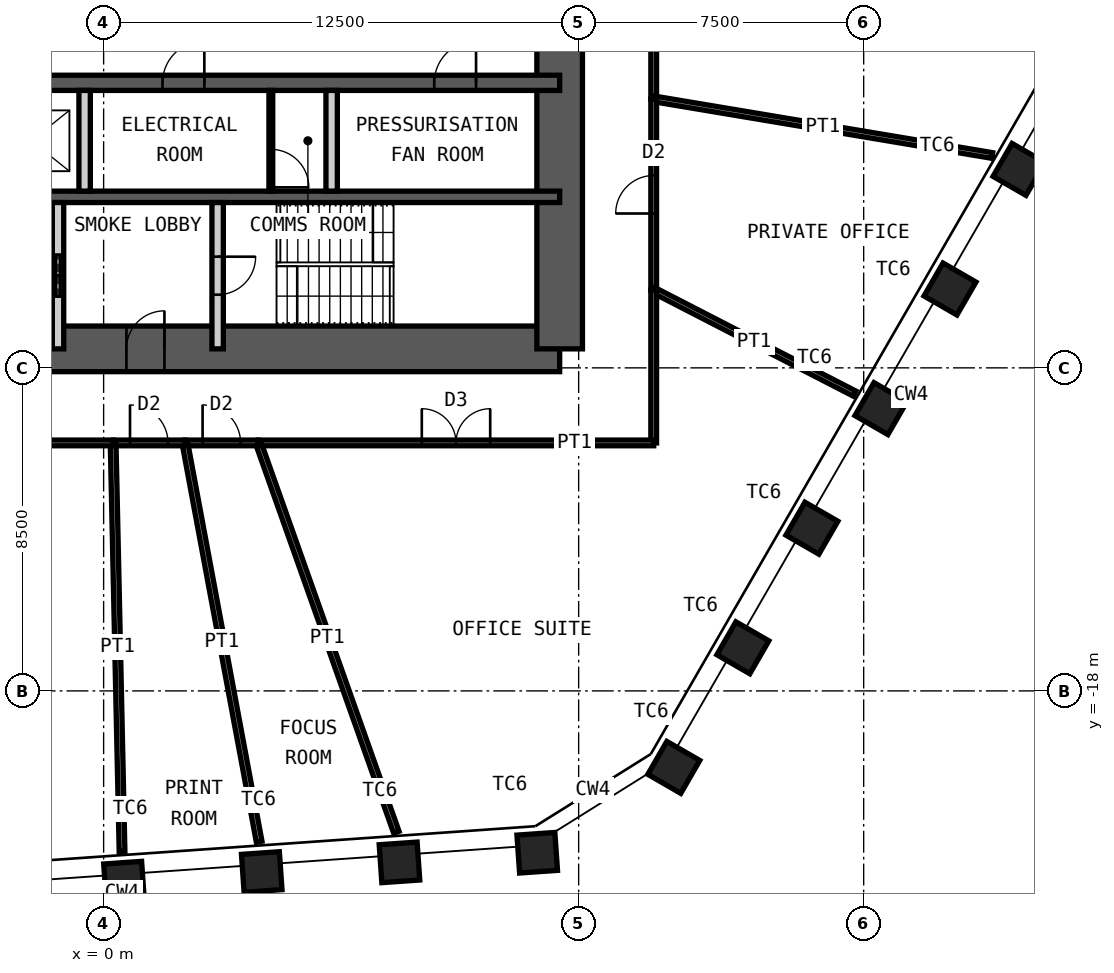
"""IFC4 building model, lengths in metres.
Left out: names, types, materials, properties, quantities, classifications, styles, units other than length and angle.
Written with IfcOpenShell. Run it as: python <this file> out.ifc"""

import sys

from ifc_helpers import new_model, si_unit, direction, frame, frame_2d, origin, origin_2d, place, context, subcontext, project, spatial, rectangle, hollow_rectangle, extrude, element, fill, save


model = new_model("IFC4")
c1 = context("Model", 3, precision=1e-05, world=origin(), true_north=direction((0.0, 1.0)))
c2 = subcontext(c1, "Body", "Model", "MODEL_VIEW")
j1 = project(units=[si_unit("LENGTHUNIT", "METRE"), si_unit("PLANEANGLEUNIT", "RADIAN")], contexts=[c1])
p1 = place(None, origin())
s1 = spatial("IfcSite", under=j1, at=p1, CompositionType="ELEMENT")
p2 = place(p1, origin())
s2 = spatial("IfcBuilding", under=s1, at=p2, CompositionType="ELEMENT")
p3 = place(p2, frame((0.0, 0.0, 230.8)))
s3 = spatial("IfcBuildingStorey", under=s2, at=p3, CompositionType="ELEMENT", Elevation=230.8)
for number, where, z_axis, x_axis in (
    (1, (24.088, -4.279, 0.0), (0.0, 0.0, 1.0), (0.5, 0.866, 0.0)),
    (2, (22.271, -7.426, 0.0), (0.0, 0.0, 1.0), (0.5, 0.866, 0.0)),
    (3, (20.454, -10.572, 0.0), (0.0, 0.0, 1.0), (0.5, 0.866, 0.0)),
    (4, (18.637, -13.719, 0.0), (0.0, 0.0, 1.0), (0.5, 0.866, 0.0)),
    (5, (16.821, -16.866, 0.0), (0.0, 0.0, 1.0), (0.5, 0.866, 0.0)),
    (6, (15.004, -20.012, 0.0), (0.0, 0.0, 1.0), (0.5, 0.866, 0.0)),
    (7, (11.41, -22.258, 0.0), (0.0, 0.0, 1.0), (0.998, 0.07, 0.0)),
    (8, (7.785, -22.512, 0.0), (0.0, 0.0, 1.0), (0.998, 0.07, 0.0)),
    (9, (4.16, -22.765, 0.0), (0.0, 0.0, 1.0), (0.998, 0.07, 0.0)),
    (10, (0.536, -23.019, 0.0), (0.0, 0.0, 1.0), (0.998, 0.07, 0.0)),
):
    element("IfcColumn", number, at=place(p3, frame(where, z_axis=z_axis, x_axis=x_axis)), inside=s3, PredefinedType="COLUMN", context=c2, shape_type="SweptSolid", body=[
        extrude(hollow_rectangle(XDim=1.0, YDim=1.0, WallThickness=0.06, at=origin_2d()), origin(), (0.0, 0.0, 1.0), 4.2),
    ])
p4 = place(p3, frame((-12.0, -9.0, 0.0), z_axis=(0.0, 0.0, 1.0), x_axis=(1.0, 0.0, 0.0)))
e11 = element("IfcWall", 11, at=p4, inside=s3, PredefinedType="SHEAR", context=c2, shape_type="SweptSolid", body=[
    extrude(rectangle(XDim=24.0, YDim=1.2, at=frame_2d((12.0, 0.0))), origin(), (0.0, 0.0, 1.0), 4.2),
])
p5 = place(p4, frame((1.35, 0.0, 0.0)))
e12 = element("IfcOpeningElement", 12, at=p5, cuts=e11, PredefinedType="OPENING", context=c2, shape_type="SweptSolid", body=[
    extrude(rectangle(XDim=1.0, YDim=2.1, at=frame_2d((0.5, 1.05))), frame((0.0, 0.61, 0.0), z_axis=(0.0, -1.0, 0.0), x_axis=(1.0, 0.0, 0.0)), (0.0, 0.0, 1.0), 1.22),
])
p6 = place(p4, frame((5.325, 0.0, 0.0)))
e13 = element("IfcOpeningElement", 13, at=p6, cuts=e11, PredefinedType="OPENING", context=c2, shape_type="SweptSolid", body=[
    extrude(rectangle(XDim=1.15, YDim=2.1, at=frame_2d((0.575, 1.05))), frame((0.0, 0.61, 0.0), z_axis=(0.0, -1.0, 0.0), x_axis=(1.0, 0.0, 0.0)), (0.0, 0.0, 1.0), 1.22),
])
p7 = place(p4, frame((12.6, 0.0, 0.0)))
e14 = element("IfcOpeningElement", 14, at=p7, cuts=e11, PredefinedType="OPENING", context=c2, shape_type="SweptSolid", body=[
    extrude(rectangle(XDim=1.0, YDim=2.1, at=frame_2d((0.5, 1.05))), frame((0.0, 0.61, 0.0), z_axis=(0.0, -1.0, 0.0), x_axis=(1.0, 0.0, 0.0)), (0.0, 0.0, 1.0), 1.22),
])
p8 = place(p3, frame((12.0, -9.0, 0.0), z_axis=(0.0, 0.0, 1.0), x_axis=(0.0, 1.0, 0.0)))
e15 = element("IfcWall", 15, at=p8, inside=s3, PredefinedType="SHEAR", context=c2, shape_type="SweptSolid", body=[
    extrude(rectangle(XDim=18.0, YDim=1.2, at=frame_2d((9.0, 0.0))), origin(), (0.0, 0.0, 1.0), 4.2),
])
p9 = place(p8, frame((8.1, 0.0, 0.0)))
e16 = element("IfcOpeningElement", 16, at=p9, cuts=e15, PredefinedType="OPENING", context=c2, shape_type="SweptSolid", body=[
    extrude(rectangle(XDim=1.8, YDim=2.1, at=frame_2d((0.9, 1.05))), frame((0.0, 0.61, 0.0), z_axis=(0.0, -1.0, 0.0), x_axis=(1.0, 0.0, 0.0)), (0.0, 0.0, 1.0), 1.22),
])
p10 = place(p3, frame((-12.0, -2.0, 0.0), z_axis=(0.0, 0.0, 1.0), x_axis=(1.0, 0.0, 0.0)))
e17 = element("IfcWall", 17, at=p10, inside=s3, PredefinedType="SHEAR", context=c2, shape_type="SweptSolid", body=[
    extrude(rectangle(XDim=24.0, YDim=0.4, at=frame_2d((12.0, 0.0))), origin(), (0.0, 0.0, 1.0), 4.2),
])
p11 = place(p10, frame((1.1, 0.0, 0.0)))
e18 = element("IfcOpeningElement", 18, at=p11, cuts=e17, PredefinedType="OPENING", context=c2, shape_type="SweptSolid", body=[
    extrude(rectangle(XDim=1.1, YDim=2.1, at=frame_2d((0.55, 1.05))), frame((0.0, 0.21, 0.0), z_axis=(0.0, -1.0, 0.0), x_axis=(1.0, 0.0, 0.0)), (0.0, 0.0, 1.0), 0.42),
])
p12 = place(p10, frame((13.55, 0.0, 0.0)))
e19 = element("IfcOpeningElement", 19, at=p12, cuts=e17, PredefinedType="OPENING", context=c2, shape_type="SweptSolid", body=[
    extrude(rectangle(XDim=1.1, YDim=2.1, at=frame_2d((0.55, 1.05))), frame((0.0, 0.21, 0.0), z_axis=(0.0, -1.0, 0.0), x_axis=(1.0, 0.0, 0.0)), (0.0, 0.0, 1.0), 0.42),
])
p13 = place(p10, frame((20.7, 0.0, 0.0)))
e20 = element("IfcOpeningElement", 20, at=p13, cuts=e17, PredefinedType="OPENING", context=c2, shape_type="SweptSolid", body=[
    extrude(rectangle(XDim=1.1, YDim=2.1, at=frame_2d((0.55, 1.05))), frame((0.0, 0.21, 0.0), z_axis=(0.0, -1.0, 0.0), x_axis=(1.0, 0.0, 0.0)), (0.0, 0.0, 1.0), 0.42),
])
p14 = place(p10, frame((4.0, 0.0, 0.0)))
e21 = element("IfcOpeningElement", 21, at=p14, cuts=e17, PredefinedType="OPENING", context=c2, shape_type="SweptSolid", body=[
    extrude(rectangle(XDim=1.0, YDim=2.1, at=frame_2d((0.5, 1.05))), frame((0.0, 0.21, 0.0), z_axis=(0.0, -1.0, 0.0), x_axis=(1.0, 0.0, 0.0)), (0.0, 0.0, 1.0), 0.42),
])
p15 = place(p10, frame((6.8, 0.0, 0.0)))
e22 = element("IfcOpeningElement", 22, at=p15, cuts=e17, PredefinedType="OPENING", context=c2, shape_type="SweptSolid", body=[
    extrude(rectangle(XDim=1.0, YDim=2.1, at=frame_2d((0.5, 1.05))), frame((0.0, 0.21, 0.0), z_axis=(0.0, -1.0, 0.0), x_axis=(1.0, 0.0, 0.0)), (0.0, 0.0, 1.0), 0.42),
])
p16 = place(p3, frame((-12.0, -5.0, 0.0), z_axis=(0.0, 0.0, 1.0), x_axis=(1.0, 0.0, 0.0)))
e23 = element("IfcWall", 23, at=p16, inside=s3, PredefinedType="SHEAR", context=c2, shape_type="SweptSolid", body=[
    extrude(rectangle(XDim=24.0, YDim=0.3, at=frame_2d((12.0, 0.0))), origin(), (0.0, 0.0, 1.0), 4.2),
])
for number, where, z_axis, x_axis in (
    (24, (-0.5, -4.85, 0.0), (0.0, 0.0, 1.0), (0.0, 1.0, 0.0)),
    (25, (6.0, -4.85, 0.0), (0.0, 0.0, 1.0), (0.0, 1.0, 0.0)),
):
    element("IfcWall", number, at=place(p3, frame(where, z_axis=z_axis, x_axis=x_axis)), inside=s3, PredefinedType="PARTITIONING", context=c2, shape_type="SweptSolid", body=[
        extrude(rectangle(XDim=2.65, YDim=0.3, at=frame_2d((1.325, 0.0))), origin(), (0.0, 0.0, 1.0), 3.98),
    ])
p17 = place(p3, frame((-1.2, -9.0, 0.0), z_axis=(0.0, 0.0, 1.0), x_axis=(0.0, 1.0, 0.0)))
e26 = element("IfcWall", 26, at=p17, inside=s3, PredefinedType="PARTITIONING", context=c2, shape_type="SweptSolid", body=[
    extrude(rectangle(XDim=3.85, YDim=0.3, at=frame_2d((1.925, 0.0))), origin(), (0.0, 0.0, 1.0), 3.98),
])
p18 = place(p17, frame((1.375, 0.0, 0.0)))
e27 = element("IfcOpeningElement", 27, at=p18, cuts=e26, PredefinedType="OPENING", context=c2, shape_type="SweptSolid", body=[
    extrude(rectangle(XDim=1.1, YDim=2.4, at=frame_2d((0.55, 1.2))), frame((0.0, 0.16, 0.0), z_axis=(0.0, -1.0, 0.0), x_axis=(1.0, 0.0, 0.0)), (0.0, 0.0, 1.0), 0.32),
])
p19 = place(p3, frame((3.0, -9.0, 0.0), z_axis=(0.0, 0.0, 1.0), x_axis=(0.0, 1.0, 0.0)))
e28 = element("IfcWall", 28, at=p19, inside=s3, PredefinedType="PARTITIONING", context=c2, shape_type="SweptSolid", body=[
    extrude(rectangle(XDim=3.85, YDim=0.3, at=frame_2d((1.925, 0.0))), origin(), (0.0, 0.0, 1.0), 3.98),
])
p20 = place(p19, frame((1.425, 0.0, 0.0)))
e29 = element("IfcOpeningElement", 29, at=p20, cuts=e28, PredefinedType="OPENING", context=c2, shape_type="SweptSolid", body=[
    extrude(rectangle(XDim=1.0, YDim=2.1, at=frame_2d((0.5, 1.05))), frame((0.0, 0.16, 0.0), z_axis=(0.0, -1.0, 0.0), x_axis=(1.0, 0.0, 0.0)), (0.0, 0.0, 1.0), 0.32),
])
p21 = place(p3, frame((4.4, -4.85, 0.0), z_axis=(0.0, 0.0, 1.0), x_axis=(0.0, 1.0, 0.0)))
e30 = element("IfcWall", 30, at=p21, inside=s3, PredefinedType="PARTITIONING", context=c2, shape_type="SweptSolid", body=[
    extrude(rectangle(XDim=2.65, YDim=0.1, at=frame_2d((1.325, 0.0))), origin(), (0.0, 0.0, 1.0), 3.98),
])
p22 = place(p21, frame((0.1, 0.0, 0.0)))
e31 = element("IfcOpeningElement", 31, at=p22, cuts=e30, PredefinedType="OPENING", context=c2, shape_type="SweptSolid", body=[
    extrude(rectangle(XDim=1.0, YDim=2.4, at=frame_2d((0.5, 1.2))), frame((0.0, 0.06, 0.0), z_axis=(0.0, -1.0, 0.0), x_axis=(1.0, 0.0, 0.0)), (0.0, 0.0, 1.0), 0.12),
])
p23 = place(p3, frame((14.475, 3.475, 0.0), z_axis=(0.0, 0.0, 1.0), x_axis=(0.0, -1.0, 0.0)))
e32 = element("IfcWall", 32, at=p23, inside=s3, PredefinedType="PARTITIONING", context=c2, shape_type="SweptSolid", body=[
    extrude(rectangle(XDim=5.896, YDim=0.15, at=frame_2d((2.948, 0.0))), origin(), (0.0, 0.0, 1.0), 4.03),
])
p24 = place(p23, frame((2.448, 0.0, 0.0)))
e33 = element("IfcOpeningElement", 33, at=p24, cuts=e32, PredefinedType="OPENING", context=c2, shape_type="SweptSolid", body=[
    extrude(rectangle(XDim=1.0, YDim=2.4, at=frame_2d((0.5, 1.2))), frame((0.0, 0.085, 0.0), z_axis=(0.0, -1.0, 0.0), x_axis=(1.0, 0.0, 0.0)), (0.0, 0.0, 1.0), 0.17),
])
p25 = place(p3, frame((23.383, -3.912, 0.0), z_axis=(0.0, 0.0, 1.0), x_axis=(-0.986293651891, 0.164999491631, 0.0)))
e34 = element("IfcWall", 34, at=p25, inside=s3, PredefinedType="PARTITIONING", context=c2, shape_type="SweptSolid", body=[
    extrude(rectangle(XDim=9.032, YDim=0.15, at=frame_2d((4.516, 0.0))), origin(), (0.0, 0.0, 1.0), 3.43),
])
p26 = place(p3, frame((14.475, -2.422, 0.0), z_axis=(0.0, 0.0, 1.0), x_axis=(0.0, -1.0, 0.0)))
e35 = element("IfcWall", 35, at=p26, inside=s3, PredefinedType="PARTITIONING", context=c2, shape_type="SweptSolid", body=[
    extrude(rectangle(XDim=5.033, YDim=0.15, at=frame_2d((2.517, 0.0))), origin(), (0.0, 0.0, 1.0), 4.03),
])
p27 = place(p26, frame((2.017, 0.0, 0.0)))
e36 = element("IfcOpeningElement", 36, at=p27, cuts=e35, PredefinedType="OPENING", context=c2, shape_type="SweptSolid", body=[
    extrude(rectangle(XDim=1.0, YDim=2.4, at=frame_2d((0.5, 1.2))), frame((0.0, 0.085, 0.0), z_axis=(0.0, -1.0, 0.0), x_axis=(1.0, 0.0, 0.0)), (0.0, 0.0, 1.0), 0.17),
])
p28 = place(p3, frame((19.759, -10.177, 0.0), z_axis=(0.0, 0.0, 1.0), x_axis=(-0.889015092721, 0.457877893017, 0.0)))
e37 = element("IfcWall", 37, at=p28, inside=s3, PredefinedType="PARTITIONING", context=c2, shape_type="SweptSolid", body=[
    extrude(rectangle(XDim=5.944, YDim=0.15, at=frame_2d((2.972, 0.0))), origin(), (0.0, 0.0, 1.0), 3.43),
])
p29 = place(p3, frame((14.475, -7.455, 0.0), z_axis=(0.0, 0.0, 1.0), x_axis=(0.0, -1.0, 0.0)))
e38 = element("IfcWall", 38, at=p29, inside=s3, PredefinedType="PARTITIONING", context=c2, shape_type="SweptSolid", body=[
    extrude(rectangle(XDim=4.02, YDim=0.15, at=frame_2d((2.01, 0.0))), origin(), (0.0, 0.0, 1.0), 4.03),
])
p30 = place(p3, frame((14.475, -11.475, 0.0), z_axis=(0.0, 0.0, 1.0), x_axis=(-1.0, 0.0, 0.0)))
e39 = element("IfcWall", 39, at=p30, inside=s3, PredefinedType="PARTITIONING", context=c2, shape_type="SweptSolid", body=[
    extrude(rectangle(XDim=10.406, YDim=0.15, at=frame_2d((5.203, 0.0))), origin(), (0.0, 0.0, 1.0), 4.03),
])
p31 = place(p30, frame((4.303, 0.0, 0.0)))
e40 = element("IfcOpeningElement", 40, at=p31, cuts=e39, PredefinedType="OPENING", context=c2, shape_type="SweptSolid", body=[
    extrude(rectangle(XDim=1.8, YDim=2.4, at=frame_2d((0.9, 1.2))), frame((0.0, 0.085, 0.0), z_axis=(0.0, -1.0, 0.0), x_axis=(1.0, 0.0, 0.0)), (0.0, 0.0, 1.0), 0.17),
])
p32 = place(p3, frame((7.703, -21.719, 0.0), z_axis=(0.0, 0.0, 1.0), x_axis=(-0.334269551553, 0.942477515331, 0.0)))
e41 = element("IfcWall", 41, at=p32, inside=s3, PredefinedType="PARTITIONING", context=c2, shape_type="SweptSolid", body=[
    extrude(rectangle(XDim=10.869, YDim=0.15, at=frame_2d((5.435, 0.0))), origin(), (0.0, 0.0, 1.0), 3.43),
])
p33 = place(p3, frame((4.07, -11.475, 0.0), z_axis=(0.0, 0.0, 1.0), x_axis=(-1.0, 0.0, 0.0)))
e42 = element("IfcWall", 42, at=p33, inside=s3, PredefinedType="PARTITIONING", context=c2, shape_type="SweptSolid", body=[
    extrude(rectangle(XDim=1.932, YDim=0.15, at=frame_2d((0.966, 0.0))), origin(), (0.0, 0.0, 1.0), 4.03),
])
p34 = place(p33, frame((0.466, 0.0, 0.0)))
e43 = element("IfcOpeningElement", 43, at=p34, cuts=e42, PredefinedType="OPENING", context=c2, shape_type="SweptSolid", body=[
    extrude(rectangle(XDim=1.0, YDim=2.4, at=frame_2d((0.5, 1.2))), frame((0.0, 0.085, 0.0), z_axis=(0.0, -1.0, 0.0), x_axis=(1.0, 0.0, 0.0)), (0.0, 0.0, 1.0), 0.17),
])
p35 = place(p3, frame((4.093, -21.969, 0.0), z_axis=(0.0, 0.0, 1.0), x_axis=(-0.183180901121, 0.983079222374, 0.0)))
e44 = element("IfcWall", 44, at=p35, inside=s3, PredefinedType="PARTITIONING", context=c2, shape_type="SweptSolid", body=[
    extrude(rectangle(XDim=10.674, YDim=0.15, at=frame_2d((5.337, 0.0))), origin(), (0.0, 0.0, 1.0), 3.43),
])
p36 = place(p3, frame((2.138, -11.475, 0.0), z_axis=(0.0, 0.0, 1.0), x_axis=(-1.0, 0.0, 0.0)))
e45 = element("IfcWall", 45, at=p36, inside=s3, PredefinedType="PARTITIONING", context=c2, shape_type="SweptSolid", body=[
    extrude(rectangle(XDim=1.888, YDim=0.15, at=frame_2d((0.944, 0.0))), origin(), (0.0, 0.0, 1.0), 4.03),
])
p37 = place(p36, frame((0.444, 0.0, 0.0)))
e46 = element("IfcOpeningElement", 46, at=p37, cuts=e45, PredefinedType="OPENING", context=c2, shape_type="SweptSolid", body=[
    extrude(rectangle(XDim=1.0, YDim=2.4, at=frame_2d((0.5, 1.2))), frame((0.0, 0.085, 0.0), z_axis=(0.0, -1.0, 0.0), x_axis=(1.0, 0.0, 0.0)), (0.0, 0.0, 1.0), 0.17),
])
p38 = place(p3, frame((0.485, -22.22, 0.0), z_axis=(0.0, 0.0, 1.0), x_axis=(-0.021806550804, 0.999762208899, 0.0)))
e47 = element("IfcWall", 47, at=p38, inside=s3, PredefinedType="PARTITIONING", context=c2, shape_type="SweptSolid", body=[
    extrude(rectangle(XDim=10.748, YDim=0.15, at=frame_2d((5.374, 0.0))), origin(), (0.0, 0.0, 1.0), 3.43),
])
p39 = place(p3, frame((0.25, -11.475, 0.0), z_axis=(0.0, 0.0, 1.0), x_axis=(-1.0, 0.0, 0.0)))
e48 = element("IfcWall", 48, at=p39, inside=s3, PredefinedType="PARTITIONING", context=c2, shape_type="SweptSolid", body=[
    extrude(rectangle(XDim=5.415, YDim=0.15, at=frame_2d((2.707, 0.0))), origin(), (0.0, 0.0, 1.0), 4.03),
])
p40 = place(p39, frame((1.807, 0.0, 0.0)))
e49 = element("IfcOpeningElement", 49, at=p40, cuts=e48, PredefinedType="OPENING", context=c2, shape_type="SweptSolid", body=[
    extrude(rectangle(XDim=1.8, YDim=2.4, at=frame_2d((0.9, 1.2))), frame((0.0, 0.085, 0.0), z_axis=(0.0, -1.0, 0.0), x_axis=(1.0, 0.0, 0.0)), (0.0, 0.0, 1.0), 0.17),
])
p41 = place(p7, origin())
e50 = element("IfcDoor", 50, at=p41, inside=s3, OperationType="SINGLE_SWING_LEFT", PredefinedType="DOOR", context=c2, shape_type="SweptSolid", body=[
    extrude(rectangle(XDim=1.0, YDim=2.1, at=frame_2d((0.5, 1.05))), frame((0.0, 0.025, 0.0), z_axis=(0.0, -1.0, 0.0), x_axis=(1.0, 0.0, 0.0)), (0.0, 0.0, 1.0), 0.05),
])
fill(e14, e50)
p42 = place(p20, origin())
e51 = element("IfcDoor", 51, at=p42, inside=s3, OperationType="SINGLE_SWING_RIGHT", PredefinedType="DOOR", context=c2, shape_type="SweptSolid", body=[
    extrude(rectangle(XDim=1.0, YDim=2.1, at=frame_2d((0.5, 1.05))), frame((0.0, 0.025, 0.0), z_axis=(0.0, -1.0, 0.0), x_axis=(1.0, 0.0, 0.0)), (0.0, 0.0, 1.0), 0.05),
])
fill(e29, e51)
p43 = place(p12, origin())
e52 = element("IfcDoor", 52, at=p43, inside=s3, OperationType="SINGLE_SWING_LEFT", PredefinedType="DOOR", context=c2, shape_type="SweptSolid", body=[
    extrude(rectangle(XDim=1.1, YDim=2.1, at=frame_2d((0.55, 1.05))), frame((0.0, 0.025, 0.0), z_axis=(0.0, -1.0, 0.0), x_axis=(1.0, 0.0, 0.0)), (0.0, 0.0, 1.0), 0.05),
])
fill(e19, e52)
p44 = place(p13, origin())
e53 = element("IfcDoor", 53, at=p44, inside=s3, OperationType="SINGLE_SWING_LEFT", PredefinedType="DOOR", context=c2, shape_type="SweptSolid", body=[
    extrude(rectangle(XDim=1.1, YDim=2.1, at=frame_2d((0.55, 1.05))), frame((0.0, 0.025, 0.0), z_axis=(0.0, -1.0, 0.0), x_axis=(1.0, 0.0, 0.0)), (0.0, 0.0, 1.0), 0.05),
])
fill(e20, e53)
p45 = place(p18, origin())
e54 = element("IfcDoor", 54, at=p45, inside=s3, OperationType="DOUBLE_DOOR_SLIDING", PredefinedType="DOOR", context=c2, shape_type="SweptSolid", body=[
    extrude(rectangle(XDim=1.1, YDim=2.4, at=frame_2d((0.55, 1.2))), frame((0.0, 0.025, 0.0), z_axis=(0.0, -1.0, 0.0), x_axis=(1.0, 0.0, 0.0)), (0.0, 0.0, 1.0), 0.05),
])
fill(e27, e54)
p46 = place(p22, origin())
e55 = element("IfcDoor", 55, at=p46, inside=s3, OperationType="SINGLE_SWING_LEFT", PredefinedType="DOOR", context=c2, shape_type="SweptSolid", body=[
    extrude(rectangle(XDim=1.0, YDim=2.4, at=frame_2d((0.5, 1.2))), frame((0.0, 0.025, 0.0), z_axis=(0.0, -1.0, 0.0), x_axis=(1.0, 0.0, 0.0)), (0.0, 0.0, 1.0), 0.05),
])
fill(e31, e55)
p47 = place(p27, origin())
e56 = element("IfcDoor", 56, at=p47, inside=s3, OperationType="SINGLE_SWING_RIGHT", PredefinedType="DOOR", context=c2, shape_type="SweptSolid", body=[
    extrude(rectangle(XDim=1.0, YDim=2.4, at=frame_2d((0.5, 1.2))), frame((0.0, 0.025, 0.0), z_axis=(0.0, -1.0, 0.0), x_axis=(1.0, 0.0, 0.0)), (0.0, 0.0, 1.0), 0.05),
])
fill(e36, e56)
p48 = place(p31, origin())
e57 = element("IfcDoor", 57, at=p48, inside=s3, OperationType="DOUBLE_DOOR_DOUBLE_SWING", PredefinedType="DOOR", context=c2, shape_type="SweptSolid", body=[
    extrude(rectangle(XDim=1.8, YDim=2.4, at=frame_2d((0.9, 1.2))), frame((0.0, 0.025, 0.0), z_axis=(0.0, -1.0, 0.0), x_axis=(1.0, 0.0, 0.0)), (0.0, 0.0, 1.0), 0.05),
])
fill(e40, e57)
p49 = place(p34, origin())
e58 = element("IfcDoor", 58, at=p49, inside=s3, OperationType="SINGLE_SWING_RIGHT", PredefinedType="DOOR", context=c2, shape_type="SweptSolid", body=[
    extrude(rectangle(XDim=1.0, YDim=2.4, at=frame_2d((0.5, 1.2))), frame((0.0, 0.025, 0.0), z_axis=(0.0, -1.0, 0.0), x_axis=(1.0, 0.0, 0.0)), (0.0, 0.0, 1.0), 0.05),
])
fill(e43, e58)
p50 = place(p37, origin())
e59 = element("IfcDoor", 59, at=p50, inside=s3, OperationType="SINGLE_SWING_RIGHT", PredefinedType="DOOR", context=c2, shape_type="SweptSolid", body=[
    extrude(rectangle(XDim=1.0, YDim=2.4, at=frame_2d((0.5, 1.2))), frame((0.0, 0.025, 0.0), z_axis=(0.0, -1.0, 0.0), x_axis=(1.0, 0.0, 0.0)), (0.0, 0.0, 1.0), 0.05),
])
fill(e46, e59)
save(model, sys.argv[1])
